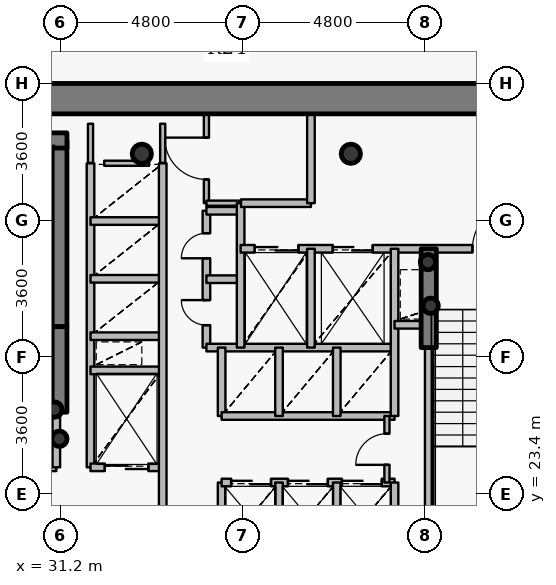
"""IFC4 building model, lengths in metres.
Left out: names, types, materials, properties, quantities, classifications, styles, units other than length and angle.
Written with IfcOpenShell. Run it as: python <this file> out.ifc"""

import sys

from ifc_helpers import new_model, si_unit, direction, frame, frame_2d, origin, origin_2d, place, context, subcontext, project, spatial, rectangle, hollow_circle, extrude, source, transform, mapped, element, fill, save


model = new_model("IFC4")
c1 = context("Model", 3, precision=1e-05, world=origin(), true_north=direction((0.0, 1.0)))
c2 = subcontext(c1, "Body", "Model", "MODEL_VIEW")
j1 = project(units=[si_unit("LENGTHUNIT", "METRE"), si_unit("PLANEANGLEUNIT", "RADIAN")], contexts=[c1])
p1 = place(None, origin())
s1 = spatial("IfcSite", under=j1, at=p1, CompositionType="ELEMENT")
p2 = place(p1, origin())
s2 = spatial("IfcBuilding", under=s1, at=p2, CompositionType="ELEMENT")
p3 = place(p2, frame((0.0, 0.0, 142.2)))
s3 = spatial("IfcBuildingStorey", under=s2, at=p3, CompositionType="ELEMENT", Elevation=142.2)
for number, where, z_axis, x_axis in (
    (1, (38.85, 32.35, 0.0), (0.0, 0.0, 1.0), (1.0, 0.0, 0.0)),
    (2, (33.35, 32.35, 0.0), (0.0, 0.0, 1.0), (1.0, 0.0, 0.0)),
):
    element("IfcColumn", number, at=place(p3, frame(where, z_axis=z_axis, x_axis=x_axis)), inside=s3, PredefinedType="COLUMN", context=c2, shape_type="SweptSolid", body=[
        extrude(hollow_circle(Radius=0.254, WallThickness=0.02, at=origin_2d()), origin(), (0.0, 0.0, 1.0), 3.75),
    ])
p4 = place(p3, frame((31.18, 27.8, 0.0), z_axis=(0.0, 0.0, 1.0), x_axis=(0.0, 1.0, 0.0)))
e3 = element("IfcWall", 3, at=p4, inside=s3, PredefinedType="SHEAR", context=c2, shape_type="SweptSolid", body=[
    extrude(rectangle(XDim=4.9, YDim=0.4, at=frame_2d((2.45, 0.0))), origin(), (0.0, 0.0, 1.0), 3.75),
])
p5 = place(p3, frame((27.28, 32.7, 0.0), z_axis=(0.0, 0.0, 1.0), x_axis=(1.0, 0.0, 0.0)))
e4 = element("IfcWall", 4, at=p5, inside=s3, PredefinedType="SHEAR", context=c2, shape_type="SweptSolid", body=[
    extrude(rectangle(XDim=4.1, YDim=0.4, at=frame_2d((2.05, 0.0))), origin(), (0.0, 0.0, 1.0), 3.75),
])
for number, where, z_axis, x_axis in (
    (5, (31.05, 25.62, 0.0), (0.0, 0.0, 1.0), (1.0, 0.0, 0.0)),
    (6, (31.18, 24.85, 0.0), (0.0, 0.0, 1.0), (1.0, 0.0, 0.0)),
    (7, (40.95, 28.35, 0.0), (0.0, 0.0, 1.0), (1.0, 0.0, 0.0)),
    (8, (40.88, 29.5, 0.0), (0.0, 0.0, 1.0), (1.0, 0.0, 0.0)),
):
    element("IfcColumn", number, at=place(p3, frame(where, z_axis=z_axis, x_axis=x_axis)), inside=s3, PredefinedType="COLUMN", context=c2, shape_type="SweptSolid", body=[
        extrude(hollow_circle(Radius=0.203, WallThickness=0.016, at=origin_2d()), origin(), (0.0, 0.0, 1.0), 3.75),
    ])
p6 = place(p3, frame((26.6, 33.8, 0.0), z_axis=(0.0, 0.0, 1.0), x_axis=(1.0, 0.0, 0.0)))
e9 = element("IfcWall", 9, at=p6, inside=s3, PredefinedType="SHEAR", context=c2, shape_type="SweptSolid", body=[
    extrude(rectangle(XDim=18.8, YDim=0.8, at=frame_2d((9.4, 0.0))), origin(), (0.0, 0.0, 1.0), 2.9),
])
p7 = place(p3, frame((31.18, 25.55, 0.0), z_axis=(0.0, 0.0, 1.0), x_axis=(0.0, 1.0, 0.0)))
e10 = element("IfcWall", 10, at=p7, inside=s3, PredefinedType="SHEAR", context=c2, shape_type="SweptSolid", body=[
    extrude(rectangle(XDim=2.25, YDim=0.4, at=frame_2d((1.125, 0.0))), origin(), (0.0, 0.0, 1.0), 3.05),
])
p8 = place(p3, frame((40.9, 27.25, 0.0), z_axis=(0.0, 0.0, 1.0), x_axis=(0.0, 1.0, 0.0)))
e11 = element("IfcWall", 11, at=p8, inside=s3, PredefinedType="SHEAR", context=c2, shape_type="SweptSolid", body=[
    extrude(rectangle(XDim=2.6, YDim=0.4, at=frame_2d((1.3, 0.0))), origin(), (0.0, 0.0, 1.0), 3.05),
])
p9 = place(p3, frame((27.56, 24.1, 0.0), z_axis=(0.0, 0.0, 1.0), x_axis=(1.0, 0.0, 0.0)))
e12 = element("IfcWall", 12, at=p9, inside=s3, PredefinedType="PARTITIONING", context=c2, shape_type="SweptSolid", body=[
    extrude(rectangle(XDim=3.54, YDim=0.2, at=frame_2d((1.77, 0.0))), origin(), (0.0, 0.0, 1.0), 3.45),
])
p10 = place(p9, frame((1.17, 0.0, 0.0)))
e13 = element("IfcOpeningElement", 13, at=p10, cuts=e12, PredefinedType="OPENING", context=c2, shape_type="SweptSolid", body=[
    extrude(rectangle(XDim=1.2, YDim=2.15, at=origin_2d()), frame((0.6, 0.11, 1.075), z_axis=(0.0, -1.0, 0.0), x_axis=(1.0, 0.0, 0.0)), (0.0, 0.0, 1.0), 0.22),
])
p11 = place(p3, frame((31.1, 24.1, 0.0), z_axis=(0.0, 0.0, 1.0), x_axis=(0.0, 1.0, 0.0)))
e14 = element("IfcWall", 14, at=p11, inside=s3, PredefinedType="PARTITIONING", context=c2, shape_type="SweptSolid", body=[
    extrude(rectangle(XDim=1.44, YDim=0.2, at=frame_2d((0.72, 0.0))), origin(), (0.0, 0.0, 1.0), 3.45),
])
p12 = place(p3, frame((32.0, 24.1, 0.0), z_axis=(0.0, 0.0, 1.0), x_axis=(0.0, 1.0, 0.0)))
e15 = element("IfcWall", 15, at=p12, inside=s3, PredefinedType="PARTITIONING", context=c2, shape_type="SweptSolid", body=[
    extrude(rectangle(XDim=8.0, YDim=0.2, at=frame_2d((4.0, 0.0))), origin(), (0.0, 0.0, 1.0), 3.45),
])
p13 = place(p3, frame((32.0, 24.1, 0.0), z_axis=(0.0, 0.0, 1.0), x_axis=(1.0, 0.0, 0.0)))
e16 = element("IfcWall", 16, at=p13, inside=s3, PredefinedType="PARTITIONING", context=c2, shape_type="SweptSolid", body=[
    extrude(rectangle(XDim=1.9, YDim=0.2, at=frame_2d((0.95, 0.0))), origin(), (0.0, 0.0, 1.0), 3.035),
])
p14 = place(p13, frame((0.375, 0.0, 0.0)))
e17 = element("IfcOpeningElement", 17, at=p14, cuts=e16, PredefinedType="OPENING", context=c2, shape_type="SweptSolid", body=[
    extrude(rectangle(XDim=1.15, YDim=2.15, at=origin_2d()), frame((0.575, 0.11, 1.075), z_axis=(0.0, -1.0, 0.0), x_axis=(1.0, 0.0, 0.0)), (0.0, 0.0, 1.0), 0.22),
])
for number, where, z_axis, x_axis in (
    (18, (32.0, 26.65, 0.0), (0.0, 0.0, 1.0), (1.0, 0.0, 0.0)),
    (19, (32.0, 27.55, 0.0), (0.0, 0.0, 1.0), (1.0, 0.0, 0.0)),
    (20, (32.0, 29.06, 0.0), (0.0, 0.0, 1.0), (1.0, 0.0, 0.0)),
    (21, (32.0, 30.58, 0.0), (0.0, 0.0, 1.0), (1.0, 0.0, 0.0)),
):
    element("IfcWall", number, at=place(p3, frame(where, z_axis=z_axis, x_axis=x_axis)), inside=s3, PredefinedType="PARTITIONING", context=c2, shape_type="SweptSolid", body=[
        extrude(rectangle(XDim=1.9, YDim=0.2, at=frame_2d((0.95, 0.0))), origin(), (0.0, 0.0, 1.0), 3.035),
    ])
p15 = place(p3, frame((33.9, 20.6, 0.0), z_axis=(0.0, 0.0, 1.0), x_axis=(0.0, 1.0, 0.0)))
e22 = element("IfcWall", 22, at=p15, inside=s3, PredefinedType="PARTITIONING", context=c2, shape_type="SweptSolid", body=[
    extrude(rectangle(XDim=11.5, YDim=0.2, at=frame_2d((5.75, 0.0))), origin(), (0.0, 0.0, 1.0), 3.035),
])
p16 = place(p3, frame((35.05, 27.25, 0.0), z_axis=(0.0, 0.0, 1.0), x_axis=(0.0, 1.0, 0.0)))
e23 = element("IfcWall", 23, at=p16, inside=s3, PredefinedType="PARTITIONING", context=c2, shape_type="SweptSolid", body=[
    extrude(rectangle(XDim=3.6, YDim=0.2, at=frame_2d((1.8, 0.0))), origin(), (0.0, 0.0, 1.0), 3.45),
])
p17 = place(p16, frame((0.59, 0.0, 0.0)))
e24 = element("IfcOpeningElement", 24, at=p17, cuts=e23, PredefinedType="OPENING", context=c2, shape_type="SweptSolid", body=[
    extrude(rectangle(XDim=0.66, YDim=2.05, at=origin_2d()), frame((0.33, 0.11, 1.025), z_axis=(0.0, -1.0, 0.0), x_axis=(1.0, 0.0, 0.0)), (0.0, 0.0, 1.0), 0.22),
])
p18 = place(p16, frame((2.35, 0.0, 0.0)))
e25 = element("IfcOpeningElement", 25, at=p18, cuts=e23, PredefinedType="OPENING", context=c2, shape_type="SweptSolid", body=[
    extrude(rectangle(XDim=0.66, YDim=2.05, at=origin_2d()), frame((0.33, 0.11, 1.025), z_axis=(0.0, -1.0, 0.0), x_axis=(1.0, 0.0, 0.0)), (0.0, 0.0, 1.0), 0.22),
])
p19 = place(p3, frame((35.05, 27.25, 0.0), z_axis=(0.0, 0.0, 1.0), x_axis=(1.0, 0.0, 0.0)))
e26 = element("IfcWall", 26, at=p19, inside=s3, PredefinedType="PARTITIONING", context=c2, shape_type="SweptSolid", body=[
    extrude(rectangle(XDim=4.95, YDim=0.2, at=frame_2d((2.475, 0.0))), origin(), (0.0, 0.0, 1.0), 3.035),
])
for number, where, z_axis, x_axis in (
    (27, (35.05, 29.05, 0.0), (0.0, 0.0, 1.0), (1.0, 0.0, 0.0)),
    (28, (35.05, 30.85, 0.0), (0.0, 0.0, 1.0), (1.0, 0.0, 0.0)),
):
    element("IfcWall", number, at=place(p3, frame(where, z_axis=z_axis, x_axis=x_axis)), inside=s3, PredefinedType="PARTITIONING", context=c2, shape_type="SweptSolid", body=[
        extrude(rectangle(XDim=0.9, YDim=0.2, at=frame_2d((0.45, 0.0))), origin(), (0.0, 0.0, 1.0), 3.45),
    ])
p20 = place(p3, frame((35.05, 31.05, 0.0), z_axis=(0.0, 0.0, 1.0), x_axis=(0.0, 1.0, 0.0)))
e29 = element("IfcWall", 29, at=p20, inside=s3, PredefinedType="PARTITIONING", context=c2, shape_type="SweptSolid", body=[
    extrude(rectangle(XDim=2.35, YDim=0.135, at=frame_2d((1.175, 0.0))), origin(), (0.0, 0.0, 1.0), 3.035),
])
p21 = place(p20, frame((0.625, 0.0, 0.0)))
e30 = element("IfcOpeningElement", 30, at=p21, cuts=e29, PredefinedType="OPENING", context=c2, shape_type="SweptSolid", body=[
    extrude(rectangle(XDim=1.1, YDim=2.15, at=origin_2d()), frame((0.55, 0.078, 1.075), z_axis=(0.0, -1.0, 0.0), x_axis=(1.0, 0.0, 0.0)), (0.0, 0.0, 1.0), 0.155),
])
p22 = place(p3, frame((35.05, 31.05, 0.0), z_axis=(0.0, 0.0, 1.0), x_axis=(1.0, 0.0, 0.0)))
e31 = element("IfcWall", 31, at=p22, inside=s3, PredefinedType="PARTITIONING", context=c2, shape_type="SweptSolid", body=[
    extrude(rectangle(XDim=0.9, YDim=0.135, at=frame_2d((0.45, 0.0))), origin(), (0.0, 0.0, 1.0), 3.45),
])
p23 = place(p3, frame((35.45, 21.9, 0.0), z_axis=(0.0, 0.0, 1.0), x_axis=(0.0, 1.0, 0.0)))
e32 = element("IfcWall", 32, at=p23, inside=s3, PredefinedType="PARTITIONING", context=c2, shape_type="SweptSolid", body=[
    extrude(rectangle(XDim=1.8, YDim=0.2, at=frame_2d((0.9, 0.0))), origin(), (0.0, 0.0, 1.0), 3.45),
])
p24 = place(p3, frame((35.45, 23.7, 0.0), z_axis=(0.0, 0.0, 1.0), x_axis=(1.0, 0.0, 0.0)))
e33 = element("IfcWall", 33, at=p24, inside=s3, PredefinedType="PARTITIONING", context=c2, shape_type="SweptSolid", body=[
    extrude(rectangle(XDim=4.55, YDim=0.2, at=frame_2d((2.275, 0.0))), origin(), (0.0, 0.0, 1.0), 3.035),
])
p25 = place(p24, frame((0.25, 0.0, 0.0)))
e34 = element("IfcOpeningElement", 34, at=p25, cuts=e33, PredefinedType="OPENING", context=c2, shape_type="SweptSolid", body=[
    extrude(rectangle(XDim=1.05, YDim=2.15, at=origin_2d()), frame((0.525, 0.11, 1.075), z_axis=(0.0, -1.0, 0.0), x_axis=(1.0, 0.0, 0.0)), (0.0, 0.0, 1.0), 0.22),
])
p26 = place(p24, frame((1.745, 0.0, 0.0)))
e35 = element("IfcOpeningElement", 35, at=p26, cuts=e33, PredefinedType="OPENING", context=c2, shape_type="SweptSolid", body=[
    extrude(rectangle(XDim=1.05, YDim=2.15, at=origin_2d()), frame((0.525, 0.11, 1.075), z_axis=(0.0, -1.0, 0.0), x_axis=(1.0, 0.0, 0.0)), (0.0, 0.0, 1.0), 0.22),
])
p27 = place(p24, frame((3.165, 0.0, 0.0)))
e36 = element("IfcOpeningElement", 36, at=p27, cuts=e33, PredefinedType="OPENING", context=c2, shape_type="SweptSolid", body=[
    extrude(rectangle(XDim=1.05, YDim=2.15, at=origin_2d()), frame((0.525, 0.11, 1.075), z_axis=(0.0, -1.0, 0.0), x_axis=(1.0, 0.0, 0.0)), (0.0, 0.0, 1.0), 0.22),
])
p28 = place(p3, frame((35.45, 25.45, 0.0), z_axis=(0.0, 0.0, 1.0), x_axis=(0.0, 1.0, 0.0)))
e37 = element("IfcWall", 37, at=p28, inside=s3, PredefinedType="PARTITIONING", context=c2, shape_type="SweptSolid", body=[
    extrude(rectangle(XDim=1.8, YDim=0.2, at=frame_2d((0.9, 0.0))), origin(), (0.0, 0.0, 1.0), 3.45),
])
p29 = place(p3, frame((35.45, 25.45, 0.0), z_axis=(0.0, 0.0, 1.0), x_axis=(1.0, 0.0, 0.0)))
e38 = element("IfcWall", 38, at=p29, inside=s3, PredefinedType="PARTITIONING", context=c2, shape_type="SweptSolid", body=[
    extrude(rectangle(XDim=4.55, YDim=0.2, at=frame_2d((2.275, 0.0))), origin(), (0.0, 0.0, 1.0), 3.035),
])
p30 = place(p3, frame((35.95, 27.25, 0.0), z_axis=(0.0, 0.0, 1.0), x_axis=(0.0, 1.0, 0.0)))
e39 = element("IfcWall", 39, at=p30, inside=s3, PredefinedType="PARTITIONING", context=c2, shape_type="SweptSolid", body=[
    extrude(rectangle(XDim=3.8, YDim=0.2, at=frame_2d((1.9, 0.0))), origin(), (0.0, 0.0, 1.0), 3.45),
])
p31 = place(p3, frame((35.95, 29.85, 0.0), z_axis=(0.0, 0.0, 1.0), x_axis=(1.0, 0.0, 0.0)))
e40 = element("IfcWall", 40, at=p31, inside=s3, PredefinedType="PARTITIONING", context=c2, shape_type="SweptSolid", body=[
    extrude(rectangle(XDim=8.49, YDim=0.2, at=frame_2d((4.245, 0.0))), origin(), (0.0, 0.0, 1.0), 3.035),
])
p32 = place(p31, frame((6.1, 0.0, 0.0)))
e41 = element("IfcOpeningElement", 41, at=p32, cuts=e40, PredefinedType="OPENING", context=c2, shape_type="SweptSolid", body=[
    extrude(rectangle(XDim=1.2, YDim=2.15, at=origin_2d()), frame((0.6, 0.11, 1.075), z_axis=(0.0, -1.0, 0.0), x_axis=(1.0, 0.0, 0.0)), (0.0, 0.0, 1.0), 0.22),
])
p33 = place(p31, frame((0.37, 0.0, 0.0)))
e42 = element("IfcOpeningElement", 42, at=p33, cuts=e40, PredefinedType="OPENING", context=c2, shape_type="SweptSolid", body=[
    extrude(rectangle(XDim=1.15, YDim=2.15, at=origin_2d()), frame((0.575, 0.11, 1.075), z_axis=(0.0, -1.0, 0.0), x_axis=(1.0, 0.0, 0.0)), (0.0, 0.0, 1.0), 0.22),
])
p34 = place(p31, frame((2.425, 0.0, 0.0)))
e43 = element("IfcOpeningElement", 43, at=p34, cuts=e40, PredefinedType="OPENING", context=c2, shape_type="SweptSolid", body=[
    extrude(rectangle(XDim=1.05, YDim=2.15, at=origin_2d()), frame((0.525, 0.11, 1.075), z_axis=(0.0, -1.0, 0.0), x_axis=(1.0, 0.0, 0.0)), (0.0, 0.0, 1.0), 0.22),
])
p35 = place(p3, frame((35.96, 31.05, 0.0), z_axis=(0.0, 0.0, 1.0), x_axis=(1.0, 0.0, 0.0)))
e44 = element("IfcWall", 44, at=p35, inside=s3, PredefinedType="PARTITIONING", context=c2, shape_type="SweptSolid", body=[
    extrude(rectangle(XDim=1.84, YDim=0.2, at=frame_2d((0.92, 0.0))), origin(), (0.0, 0.0, 1.0), 3.45),
])
for number, where, z_axis, x_axis in (
    (45, (36.96, 21.9, 0.0), (0.0, 0.0, 1.0), (0.0, 1.0, 0.0)),
    (46, (36.96, 25.45, 0.0), (0.0, 0.0, 1.0), (0.0, 1.0, 0.0)),
):
    element("IfcWall", number, at=place(p3, frame(where, z_axis=z_axis, x_axis=x_axis)), inside=s3, PredefinedType="PARTITIONING", context=c2, shape_type="SweptSolid", body=[
        extrude(rectangle(XDim=1.8, YDim=0.2, at=frame_2d((0.9, 0.0))), origin(), (0.0, 0.0, 1.0), 3.45),
    ])
p36 = place(p3, frame((37.8, 27.25, 0.0), z_axis=(0.0, 0.0, 1.0), x_axis=(0.0, 1.0, 0.0)))
e47 = element("IfcWall", 47, at=p36, inside=s3, PredefinedType="PARTITIONING", context=c2, shape_type="SweptSolid", body=[
    extrude(rectangle(XDim=2.6, YDim=0.2, at=frame_2d((1.3, 0.0))), origin(), (0.0, 0.0, 1.0), 3.45),
])
p37 = place(p3, frame((37.8, 31.05, 0.0), z_axis=(0.0, 0.0, 1.0), x_axis=(0.0, 1.0, 0.0)))
e48 = element("IfcWall", 48, at=p37, inside=s3, PredefinedType="PARTITIONING", context=c2, shape_type="SweptSolid", body=[
    extrude(rectangle(XDim=2.35, YDim=0.2, at=frame_2d((1.175, 0.0))), origin(), (0.0, 0.0, 1.0), 3.035),
])
for number, where, z_axis, x_axis in (
    (49, (38.48, 21.9, 0.0), (0.0, 0.0, 1.0), (0.0, 1.0, 0.0)),
    (50, (38.48, 25.45, 0.0), (0.0, 0.0, 1.0), (0.0, 1.0, 0.0)),
):
    element("IfcWall", number, at=place(p3, frame(where, z_axis=z_axis, x_axis=x_axis)), inside=s3, PredefinedType="PARTITIONING", context=c2, shape_type="SweptSolid", body=[
        extrude(rectangle(XDim=1.8, YDim=0.2, at=frame_2d((0.9, 0.0))), origin(), (0.0, 0.0, 1.0), 3.45),
    ])
p38 = place(p3, frame((39.8, 23.7, 0.0), z_axis=(0.0, 0.0, 1.0), x_axis=(0.0, 1.0, 0.0)))
e51 = element("IfcWall", 51, at=p38, inside=s3, PredefinedType="PARTITIONING", context=c2, shape_type="SweptSolid", body=[
    extrude(rectangle(XDim=1.75, YDim=0.135, at=frame_2d((0.875, 0.0))), origin(), (0.0, 0.0, 1.0), 3.45),
])
p39 = place(p38, frame((0.465, 0.0, 0.0)))
e52 = element("IfcOpeningElement", 52, at=p39, cuts=e51, PredefinedType="OPENING", context=c2, shape_type="SweptSolid", body=[
    extrude(rectangle(XDim=0.82, YDim=2.1, at=origin_2d()), frame((0.41, 0.078, 1.05), z_axis=(0.0, -1.0, 0.0), x_axis=(1.0, 0.0, 0.0)), (0.0, 0.0, 1.0), 0.155),
])
p40 = place(p3, frame((40.0, 21.9, 0.0), z_axis=(0.0, 0.0, 1.0), x_axis=(0.0, 1.0, 0.0)))
e53 = element("IfcWall", 53, at=p40, inside=s3, PredefinedType="PARTITIONING", context=c2, shape_type="SweptSolid", body=[
    extrude(rectangle(XDim=1.8, YDim=0.2, at=frame_2d((0.9, 0.0))), origin(), (0.0, 0.0, 1.0), 3.45),
])
p41 = place(p3, frame((40.0, 25.45, 0.0), z_axis=(0.0, 0.0, 1.0), x_axis=(0.0, 1.0, 0.0)))
e54 = element("IfcWall", 54, at=p41, inside=s3, PredefinedType="PARTITIONING", context=c2, shape_type="SweptSolid", body=[
    extrude(rectangle(XDim=4.4, YDim=0.2, at=frame_2d((2.2, 0.0))), origin(), (0.0, 0.0, 1.0), 3.45),
])
p42 = place(p3, frame((40.0, 27.85, 0.0), z_axis=(0.0, 0.0, 1.0), x_axis=(1.0, 0.0, 0.0)))
e55 = element("IfcWall", 55, at=p42, inside=s3, PredefinedType="PARTITIONING", context=c2, shape_type="SweptSolid", body=[
    extrude(rectangle(XDim=0.9, YDim=0.2, at=frame_2d((0.45, 0.0))), origin(), (0.0, 0.0, 1.0), 3.45),
])
p43 = place(p3, frame((40.9, 21.33, 0.0), z_axis=(0.0, 0.0, 1.0), x_axis=(0.0, 1.0, 0.0)))
e56 = element("IfcWall", 56, at=p43, inside=s3, PredefinedType="PARTITIONING", context=c2, shape_type="SweptSolid", body=[
    extrude(rectangle(XDim=5.91, YDim=0.2, at=frame_2d((2.955, 0.0))), origin(), (0.0, 0.0, 1.0), 2.985),
])
p44 = place(p3, frame((32.36, 32.1, 0.0), z_axis=(0.0, 0.0, 1.0), x_axis=(1.0, 0.0, 0.0)))
e57 = element("IfcWall", 57, at=p44, inside=s3, PredefinedType="PARTITIONING", context=c2, shape_type="SweptSolid", body=[
    extrude(rectangle(XDim=1.18, YDim=0.135, at=frame_2d((0.59, 0.0))), origin(), (0.0, 0.0, 1.0), 3.035),
])
p45 = place(p3, frame((32.0, 33.14, 0.0), z_axis=(0.0, 0.0, 1.0), x_axis=(0.0, -1.0, 0.0)))
e58 = element("IfcWall", 58, at=p45, inside=s3, PredefinedType="PARTITIONING", context=c2, shape_type="SweptSolid", body=[
    extrude(rectangle(XDim=1.03, YDim=0.135, at=frame_2d((0.515, 0.0))), origin(), (0.0, 0.0, 1.0), 2.985),
])
p46 = place(p3, frame((33.9, 32.11, 0.0), z_axis=(0.0, 0.0, 1.0), x_axis=(0.0, 1.0, 0.0)))
e59 = element("IfcWall", 59, at=p46, inside=s3, PredefinedType="PARTITIONING", context=c2, shape_type="SweptSolid", body=[
    extrude(rectangle(XDim=1.03, YDim=0.135, at=frame_2d((0.515, 0.0))), origin(), (0.0, 0.0, 1.0), 3.035),
])
m1 = source(origin(), c2, "Body", "SweptSolid", [
    extrude(rectangle(XDim=1.2, YDim=2.15, at=origin_2d()), frame((0.6, 0.025, 1.075), z_axis=(0.0, -1.0, 0.0), x_axis=(1.0, 0.0, 0.0)), (0.0, 0.0, 1.0), 0.05),
])
p47 = place(p32, origin())
e60 = element("IfcDoor", 60, at=p47, inside=s3, OperationType="SINGLE_SWING_RIGHT", PredefinedType="DOOR", context=c2, shape_type="MappedRepresentation", body=[
    mapped(m1, transform((0.0, 0.0, 0.0), x_axis=(1.0, 0.0, 0.0), y_axis=(0.0, 1.0, 0.0), z_axis=(0.0, 0.0, 1.0), scale=1.0)),
])
fill(e41, e60)
m2 = source(origin(), c2, "Body", "SweptSolid", [
    extrude(rectangle(XDim=1.15, YDim=2.15, at=origin_2d()), frame((0.575, 0.025, 1.075), z_axis=(0.0, -1.0, 0.0), x_axis=(1.0, 0.0, 0.0)), (0.0, 0.0, 1.0), 0.05),
])
p48 = place(p33, origin())
e61 = element("IfcDoor", 61, at=p48, inside=s3, OperationType="DOUBLE_DOOR_SLIDING", PredefinedType="USERDEFINED", context=c2, shape_type="MappedRepresentation", body=[
    mapped(m2, transform((0.0, 0.0, 0.0), x_axis=(1.0, 0.0, 0.0), y_axis=(0.0, 1.0, 0.0), z_axis=(0.0, 0.0, 1.0), scale=1.0)),
])
fill(e42, e61)
p49 = place(p14, origin())
e62 = element("IfcDoor", 62, at=p49, inside=s3, OperationType="DOUBLE_DOOR_SLIDING", PredefinedType="USERDEFINED", context=c2, shape_type="MappedRepresentation", body=[
    mapped(m2, transform((0.0, 0.0, 0.0), x_axis=(1.0, 0.0, 0.0), y_axis=(0.0, 1.0, 0.0), z_axis=(0.0, 0.0, 1.0), scale=1.0)),
])
fill(e17, e62)
m3 = source(origin(), c2, "Body", "SweptSolid", [
    extrude(rectangle(XDim=1.05, YDim=2.15, at=origin_2d()), frame((0.525, 0.025, 1.075), z_axis=(0.0, -1.0, 0.0), x_axis=(1.0, 0.0, 0.0)), (0.0, 0.0, 1.0), 0.05),
])
p50 = place(p34, origin())
e63 = element("IfcDoor", 63, at=p50, inside=s3, OperationType="DOUBLE_DOOR_SLIDING", PredefinedType="USERDEFINED", context=c2, shape_type="MappedRepresentation", body=[
    mapped(m3, transform((0.0, 0.0, 0.0), x_axis=(1.0, 0.0, 0.0), y_axis=(0.0, 1.0, 0.0), z_axis=(0.0, 0.0, 1.0), scale=1.0)),
])
fill(e43, e63)
p51 = place(p25, origin())
e64 = element("IfcDoor", 64, at=p51, inside=s3, OperationType="DOUBLE_DOOR_SLIDING", PredefinedType="USERDEFINED", context=c2, shape_type="MappedRepresentation", body=[
    mapped(m3, transform((0.0, 0.0, 0.0), x_axis=(1.0, 0.0, 0.0), y_axis=(0.0, 1.0, 0.0), z_axis=(0.0, 0.0, 1.0), scale=1.0)),
])
fill(e34, e64)
p52 = place(p26, origin())
e65 = element("IfcDoor", 65, at=p52, inside=s3, OperationType="DOUBLE_DOOR_SLIDING", PredefinedType="USERDEFINED", context=c2, shape_type="MappedRepresentation", body=[
    mapped(m3, transform((0.0, 0.0, 0.0), x_axis=(1.0, 0.0, 0.0), y_axis=(0.0, 1.0, 0.0), z_axis=(0.0, 0.0, 1.0), scale=1.0)),
])
fill(e35, e65)
p53 = place(p27, origin())
e66 = element("IfcDoor", 66, at=p53, inside=s3, OperationType="DOUBLE_DOOR_SLIDING", PredefinedType="USERDEFINED", context=c2, shape_type="MappedRepresentation", body=[
    mapped(m3, transform((0.0, 0.0, 0.0), x_axis=(1.0, 0.0, 0.0), y_axis=(0.0, 1.0, 0.0), z_axis=(0.0, 0.0, 1.0), scale=1.0)),
])
fill(e36, e66)
m4 = source(origin(), c2, "Body", "SweptSolid", [
    extrude(rectangle(XDim=0.66, YDim=2.05, at=origin_2d()), frame((0.33, 0.025, 1.025), z_axis=(0.0, -1.0, 0.0), x_axis=(1.0, 0.0, 0.0)), (0.0, 0.0, 1.0), 0.05),
])
p54 = place(p17, origin())
e67 = element("IfcDoor", 67, at=p54, inside=s3, OperationType="SINGLE_SWING_RIGHT", PredefinedType="USERDEFINED", context=c2, shape_type="MappedRepresentation", body=[
    mapped(m4, transform((0.0, 0.0, 0.0), x_axis=(1.0, 0.0, 0.0), y_axis=(0.0, 1.0, 0.0), z_axis=(0.0, 0.0, 1.0), scale=1.0)),
])
fill(e24, e67)
p55 = place(p18, origin())
e68 = element("IfcDoor", 68, at=p55, inside=s3, OperationType="SINGLE_SWING_LEFT", PredefinedType="USERDEFINED", context=c2, shape_type="MappedRepresentation", body=[
    mapped(m4, transform((0.0, 0.0, 0.0), x_axis=(1.0, 0.0, 0.0), y_axis=(0.0, 1.0, 0.0), z_axis=(0.0, 0.0, 1.0), scale=1.0)),
])
fill(e25, e68)
m5 = source(origin(), c2, "Body", "SweptSolid", [
    extrude(rectangle(XDim=1.1, YDim=2.15, at=origin_2d()), frame((0.55, 0.025, 1.075), z_axis=(0.0, -1.0, 0.0), x_axis=(1.0, 0.0, 0.0)), (0.0, 0.0, 1.0), 0.05),
])
p56 = place(p21, origin())
e69 = element("IfcDoor", 69, at=p56, inside=s3, OperationType="SINGLE_SWING_RIGHT", PredefinedType="DOOR", context=c2, shape_type="MappedRepresentation", body=[
    mapped(m5, transform((0.0, 0.0, 0.0), x_axis=(1.0, 0.0, 0.0), y_axis=(0.0, 1.0, 0.0), z_axis=(0.0, 0.0, 1.0), scale=1.0)),
])
fill(e30, e69)
m6 = source(origin(), c2, "Body", "SweptSolid", [
    extrude(rectangle(XDim=0.82, YDim=2.1, at=origin_2d()), frame((0.41, 0.025, 1.05), z_axis=(0.0, -1.0, 0.0), x_axis=(1.0, 0.0, 0.0)), (0.0, 0.0, 1.0), 0.05),
])
p57 = place(p39, origin())
e70 = element("IfcDoor", 70, at=p57, inside=s3, OperationType="SINGLE_SWING_LEFT", PredefinedType="DOOR", context=c2, shape_type="MappedRepresentation", body=[
    mapped(m6, transform((0.0, 0.0, 0.0), x_axis=(1.0, 0.0, 0.0), y_axis=(0.0, 1.0, 0.0), z_axis=(0.0, 0.0, 1.0), scale=1.0)),
])
fill(e52, e70)
save(model, sys.argv[1])
